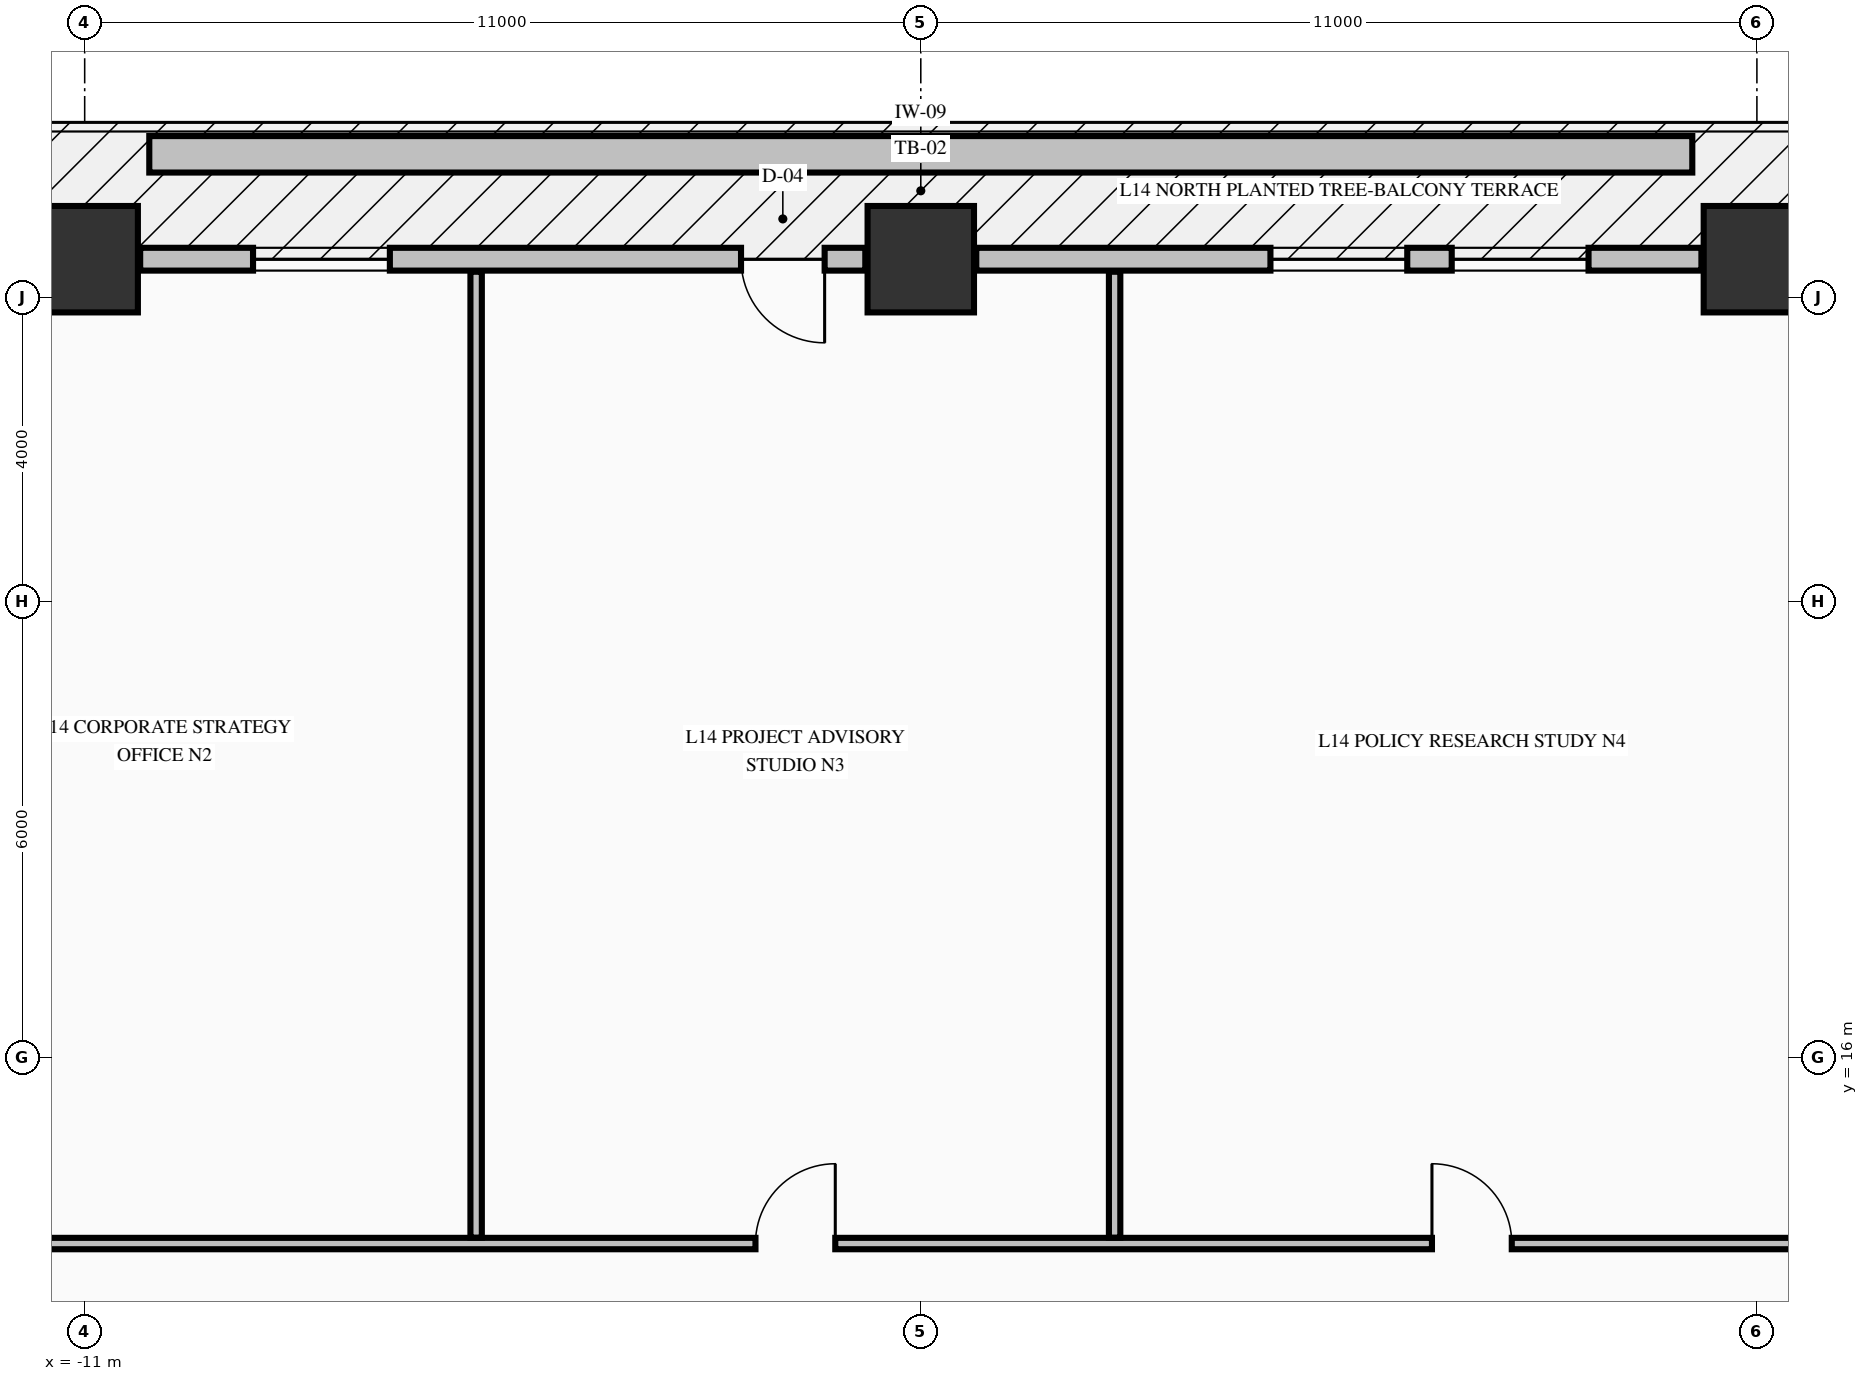
"""IFC4 building model, lengths in metres.
Left out: names, types, materials, properties, quantities, classifications, styles, units other than length and angle.
Written with IfcOpenShell. Run it as: python <this file> out.ifc"""

import sys

from ifc_helpers import new_model, si_unit, direction, frame, frame_2d, origin, origin_2d, place, context, subcontext, project, spatial, rectangle, extrude, element, fill, save


model = new_model("IFC4")
c1 = context("Model", 3, precision=1e-05, world=origin(), true_north=direction((0.0, 1.0)))
c2 = subcontext(c1, "Body", "Model", "MODEL_VIEW")
j1 = project(units=[si_unit("LENGTHUNIT", "METRE"), si_unit("PLANEANGLEUNIT", "RADIAN")], contexts=[c1])
p1 = place(None, origin())
s1 = spatial("IfcSite", under=j1, at=p1, CompositionType="ELEMENT")
p2 = place(p1, origin())
s2 = spatial("IfcBuilding", under=s1, at=p2, CompositionType="ELEMENT")
p3 = place(p2, frame((0.0, 0.0, 60.76)))
s3 = spatial("IfcBuildingStorey", under=s2, at=p3, CompositionType="ELEMENT", Elevation=60.76)
for number, where, z_axis, x_axis in (
    (1, (-11.0, 26.5, -0.3), (0.0, 0.0, 1.0), (1.0, 0.0, 0.0)),
    (2, (0.0, 26.5, -0.3), (0.0, 0.0, 1.0), (1.0, 0.0, 0.0)),
    (3, (11.0, 26.5, -0.3), (0.0, 0.0, 1.0), (1.0, 0.0, 0.0)),
):
    element("IfcColumn", number, at=place(p3, frame(where, z_axis=z_axis, x_axis=x_axis)), inside=s3, PredefinedType="COLUMN", context=c2, shape_type="SweptSolid", body=[
        extrude(rectangle(XDim=1.4, YDim=1.4, at=origin_2d()), origin(), (0.0, 0.0, 1.0), 3.62),
    ])
p4 = place(p3, frame((-0.73, 26.5, 0.0), z_axis=(0.0, 0.0, 1.0), x_axis=(-1.0, 0.0, 0.0)))
e4 = element("IfcWall", 4, at=p4, inside=s3, PredefinedType="STANDARD", context=c2, shape_type="SweptSolid", body=[
    extrude(rectangle(XDim=9.54, YDim=0.3, at=frame_2d((4.77, 0.0))), origin(), (0.0, 0.0, 1.0), 2.712),
])
p5 = place(p4, frame((0.535, 0.0, 0.0)))
e5 = element("IfcOpeningElement", 5, at=p5, cuts=e4, PredefinedType="OPENING", context=c2, shape_type="SweptSolid", body=[
    extrude(rectangle(XDim=1.1, YDim=2.15, at=frame_2d((0.55, 1.075))), frame((0.0, 0.16, 0.0), z_axis=(0.0, -1.0, 0.0), x_axis=(1.0, 0.0, 0.0)), (0.0, 0.0, 1.0), 0.32),
])
p6 = place(p4, frame((6.255, 0.0, 0.78)))
e6 = element("IfcOpeningElement", 6, at=p6, cuts=e4, PredefinedType="OPENING", context=c2, shape_type="SweptSolid", body=[
    extrude(rectangle(XDim=1.8, YDim=1.72, at=frame_2d((0.9, 0.86))), frame((0.0, 0.16, 0.0), z_axis=(0.0, -1.0, 0.0), x_axis=(1.0, 0.0, 0.0)), (0.0, 0.0, 1.0), 0.32),
])
p7 = place(p3, frame((10.27, 26.5, 0.0), z_axis=(0.0, 0.0, 1.0), x_axis=(-1.0, 0.0, 0.0)))
e7 = element("IfcWall", 7, at=p7, inside=s3, PredefinedType="STANDARD", context=c2, shape_type="SweptSolid", body=[
    extrude(rectangle(XDim=9.54, YDim=0.3, at=frame_2d((4.77, 0.0))), origin(), (0.0, 0.0, 1.0), 2.712),
])
p8 = place(p7, frame((1.485, 0.0, 0.78)))
e8 = element("IfcOpeningElement", 8, at=p8, cuts=e7, PredefinedType="OPENING", context=c2, shape_type="SweptSolid", body=[
    extrude(rectangle(XDim=1.8, YDim=1.72, at=frame_2d((0.9, 0.86))), frame((0.0, 0.16, 0.0), z_axis=(0.0, -1.0, 0.0), x_axis=(1.0, 0.0, 0.0)), (0.0, 0.0, 1.0), 0.32),
])
p9 = place(p7, frame((3.87, 0.0, 0.78)))
e9 = element("IfcOpeningElement", 9, at=p9, cuts=e7, PredefinedType="OPENING", context=c2, shape_type="SweptSolid", body=[
    extrude(rectangle(XDim=1.8, YDim=1.72, at=frame_2d((0.9, 0.86))), frame((0.0, 0.16, 0.0), z_axis=(0.0, -1.0, 0.0), x_axis=(1.0, 0.0, 0.0)), (0.0, 0.0, 1.0), 0.32),
])
p10 = place(p3, frame((-28.835, 13.55, 0.0), z_axis=(0.0, 0.0, 1.0), x_axis=(1.0, 0.0, 0.0)))
e10 = element("IfcWall", 10, at=p10, inside=s3, PredefinedType="PARTITIONING", context=c2, shape_type="SweptSolid", body=[
    extrude(rectangle(XDim=52.67, YDim=0.15, at=frame_2d((26.335, 0.0))), origin(), (0.0, 0.0, 1.0), 3.32),
])
p11 = place(p10, frame((11.38, 0.0, 0.0)))
e11 = element("IfcOpeningElement", 11, at=p11, cuts=e10, PredefinedType="OPENING", context=c2, shape_type="SweptSolid", body=[
    extrude(rectangle(XDim=1.05, YDim=2.15, at=frame_2d((0.525, 1.075))), frame((0.0, 0.085, 0.0), z_axis=(0.0, -1.0, 0.0), x_axis=(1.0, 0.0, 0.0)), (0.0, 0.0, 1.0), 0.17),
])
p12 = place(p10, frame((15.91, 0.0, 0.0)))
e12 = element("IfcOpeningElement", 12, at=p12, cuts=e10, PredefinedType="OPENING", context=c2, shape_type="SweptSolid", body=[
    extrude(rectangle(XDim=1.05, YDim=2.15, at=frame_2d((0.525, 1.075))), frame((0.0, 0.085, 0.0), z_axis=(0.0, -1.0, 0.0), x_axis=(1.0, 0.0, 0.0)), (0.0, 0.0, 1.0), 0.17),
])
p13 = place(p10, frame((26.66, 0.0, 0.0)))
e13 = element("IfcOpeningElement", 13, at=p13, cuts=e10, PredefinedType="OPENING", context=c2, shape_type="SweptSolid", body=[
    extrude(rectangle(XDim=1.05, YDim=2.15, at=frame_2d((0.525, 1.075))), frame((0.0, 0.085, 0.0), z_axis=(0.0, -1.0, 0.0), x_axis=(1.0, 0.0, 0.0)), (0.0, 0.0, 1.0), 0.17),
])
p14 = place(p10, frame((35.56, 0.0, 0.0)))
e14 = element("IfcOpeningElement", 14, at=p14, cuts=e10, PredefinedType="OPENING", context=c2, shape_type="SweptSolid", body=[
    extrude(rectangle(XDim=1.05, YDim=2.15, at=frame_2d((0.525, 1.075))), frame((0.0, 0.085, 0.0), z_axis=(0.0, -1.0, 0.0), x_axis=(1.0, 0.0, 0.0)), (0.0, 0.0, 1.0), 0.17),
])
p15 = place(p10, frame((44.19, 0.0, 0.0)))
e15 = element("IfcOpeningElement", 15, at=p15, cuts=e10, PredefinedType="OPENING", context=c2, shape_type="SweptSolid", body=[
    extrude(rectangle(XDim=1.05, YDim=2.15, at=frame_2d((0.525, 1.075))), frame((0.0, 0.085, 0.0), z_axis=(0.0, -1.0, 0.0), x_axis=(1.0, 0.0, 0.0)), (0.0, 0.0, 1.0), 0.17),
])
for number, where, z_axis, x_axis in (
    (16, (-5.85, 13.628, 0.0), (0.0, 0.0, 1.0), (0.0, 1.0, 0.0)),
    (17, (2.55, 13.628, 0.0), (0.0, 0.0, 1.0), (0.0, 1.0, 0.0)),
):
    element("IfcWall", number, at=place(p3, frame(where, z_axis=z_axis, x_axis=x_axis)), inside=s3, PredefinedType="PARTITIONING", context=c2, shape_type="SweptSolid", body=[
        extrude(rectangle(XDim=12.707, YDim=0.15, at=frame_2d((6.354, 0.0))), origin(), (0.0, 0.0, 1.0), 3.32),
    ])
p16 = place(p3, frame((-10.15, 27.88, -0.04), z_axis=(0.0, 0.0, 1.0), x_axis=(1.0, 0.0, 0.0)))
e18 = element("IfcWall", 18, at=p16, inside=s3, PredefinedType="PARAPET", context=c2, shape_type="SweptSolid", body=[
    extrude(rectangle(XDim=20.3, YDim=0.48, at=frame_2d((10.15, 0.0))), origin(), (0.0, 0.0, 1.0), 0.52),
])
p17 = place(p5, origin())
e19 = element("IfcDoor", 19, at=p17, inside=s3, OperationType="SINGLE_SWING_LEFT", PredefinedType="DOOR", context=c2, shape_type="SweptSolid", body=[
    extrude(rectangle(XDim=1.1, YDim=2.15, at=frame_2d((0.55, 1.075))), frame((0.0, 0.025, 0.0), z_axis=(0.0, -1.0, 0.0), x_axis=(1.0, 0.0, 0.0)), (0.0, 0.0, 1.0), 0.05),
])
fill(e5, e19)
p18 = place(p6, origin())
e20 = element("IfcWindow", 20, at=p18, inside=s3, PartitioningType="SINGLE_PANEL", PredefinedType="WINDOW", context=c2, shape_type="SweptSolid", body=[
    extrude(rectangle(XDim=1.8, YDim=1.72, at=frame_2d((0.9, 0.86))), frame((0.0, 0.03, 0.0), z_axis=(0.0, -1.0, 0.0), x_axis=(1.0, 0.0, 0.0)), (0.0, 0.0, 1.0), 0.06),
])
fill(e6, e20)
p19 = place(p8, origin())
e21 = element("IfcWindow", 21, at=p19, inside=s3, PartitioningType="SINGLE_PANEL", PredefinedType="WINDOW", context=c2, shape_type="SweptSolid", body=[
    extrude(rectangle(XDim=1.8, YDim=1.72, at=frame_2d((0.9, 0.86))), frame((0.0, 0.03, 0.0), z_axis=(0.0, -1.0, 0.0), x_axis=(1.0, 0.0, 0.0)), (0.0, 0.0, 1.0), 0.06),
])
fill(e8, e21)
p20 = place(p9, origin())
e22 = element("IfcWindow", 22, at=p20, inside=s3, PartitioningType="SINGLE_PANEL", PredefinedType="WINDOW", context=c2, shape_type="SweptSolid", body=[
    extrude(rectangle(XDim=1.8, YDim=1.72, at=frame_2d((0.9, 0.86))), frame((0.0, 0.03, 0.0), z_axis=(0.0, -1.0, 0.0), x_axis=(1.0, 0.0, 0.0)), (0.0, 0.0, 1.0), 0.06),
])
fill(e9, e22)
p21 = place(p13, origin())
e23 = element("IfcDoor", 23, at=p21, inside=s3, OperationType="SINGLE_SWING_RIGHT", PredefinedType="DOOR", context=c2, shape_type="SweptSolid", body=[
    extrude(rectangle(XDim=1.05, YDim=2.15, at=frame_2d((0.525, 1.075))), frame((0.0, 0.025, 0.0), z_axis=(0.0, -1.0, 0.0), x_axis=(1.0, 0.0, 0.0)), (0.0, 0.0, 1.0), 0.05),
])
fill(e13, e23)
p22 = place(p14, origin())
e24 = element("IfcDoor", 24, at=p22, inside=s3, OperationType="SINGLE_SWING_LEFT", PredefinedType="DOOR", context=c2, shape_type="SweptSolid", body=[
    extrude(rectangle(XDim=1.05, YDim=2.15, at=frame_2d((0.525, 1.075))), frame((0.0, 0.025, 0.0), z_axis=(0.0, -1.0, 0.0), x_axis=(1.0, 0.0, 0.0)), (0.0, 0.0, 1.0), 0.05),
])
fill(e14, e24)
save(model, sys.argv[1])
